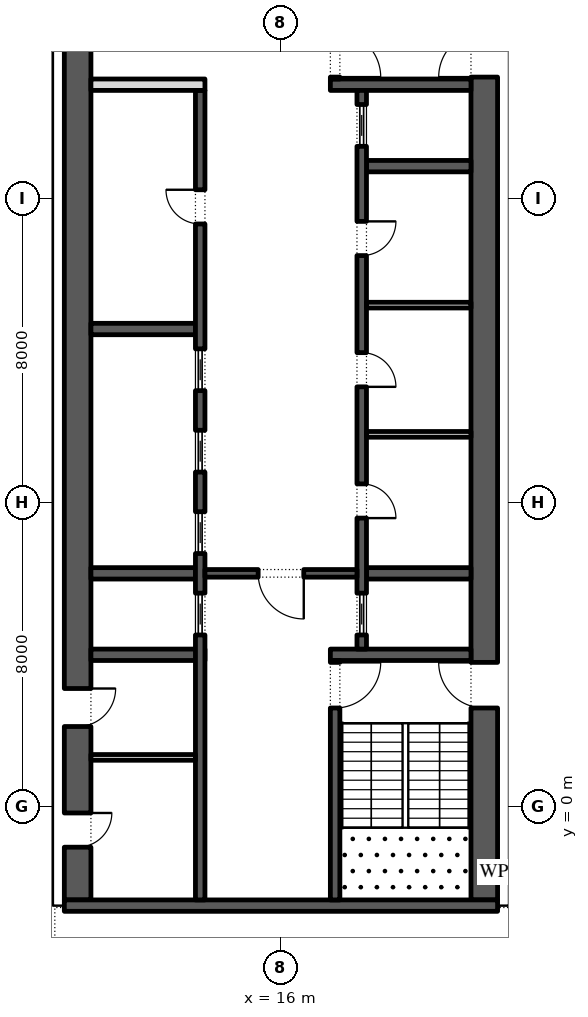
"""IFC4 building model, lengths in metres.
Left out: names, types, materials, properties, quantities, classifications, styles, units other than length and angle.
Written with IfcOpenShell. Run it as: python <this file> out.ifc"""

import sys

from ifc_helpers import new_model, si_unit, direction, frame, frame_2d, origin, place, context, subcontext, project, spatial, rectangle, extrude, element, fill, save


model = new_model("IFC4")
c1 = context("Model", 3, precision=1e-05, world=origin(), true_north=direction((0.0, 1.0)))
c2 = subcontext(c1, "Body", "Model", "MODEL_VIEW")
j1 = project(units=[si_unit("LENGTHUNIT", "METRE"), si_unit("PLANEANGLEUNIT", "RADIAN")], contexts=[c1])
p1 = place(None, origin())
s1 = spatial("IfcSite", under=j1, at=p1, CompositionType="ELEMENT")
p2 = place(p1, origin())
s2 = spatial("IfcBuilding", under=s1, at=p2, CompositionType="ELEMENT")
p3 = place(p2, frame((0.0, 0.0, 188.4)))
s3 = spatial("IfcBuildingStorey", under=s2, at=p3, CompositionType="ELEMENT", Elevation=188.4)
p4 = place(p3, frame((33.157, -5.092, 0.0), z_axis=(0.0, 0.0, 1.0), x_axis=(-0.224950279389, 0.974370243697, 0.0)))
e1 = element("IfcWall", 1, at=p4, inside=s3, PredefinedType="STANDARD", context=c2, shape_type="SweptSolid", body=[
    extrude(rectangle(XDim=49.5, YDim=0.3, at=frame_2d((24.75, 0.0))), origin(), (0.0, 0.0, 1.0), 4.0),
])
p5 = place(p4, frame((2.207, 0.0, 0.0)))
e2 = element("IfcOpeningElement", 2, at=p5, cuts=e1, PredefinedType="OPENING", context=c2, shape_type="SweptSolid", body=[
    extrude(rectangle(XDim=2.4, YDim=3.125, at=frame_2d((1.2, 1.562))), frame((0.0, 0.16, 0.0), z_axis=(0.0, -1.0, 0.0), x_axis=(1.0, 0.0, 0.0)), (0.0, 0.0, 1.0), 0.32),
])
p6 = place(p4, frame((8.121, 0.0, 0.45)))
e3 = element("IfcOpeningElement", 3, at=p6, cuts=e1, PredefinedType="OPENING", context=c2, shape_type="SweptSolid", body=[
    extrude(rectangle(XDim=4.5, YDim=2.875, at=frame_2d((2.25, 1.438))), frame((0.0, 0.16, 0.0), z_axis=(0.0, -1.0, 0.0), x_axis=(1.0, 0.0, 0.0)), (0.0, 0.0, 1.0), 0.32),
])
p7 = place(p4, frame((15.236, 0.0, 0.45)))
e4 = element("IfcOpeningElement", 4, at=p7, cuts=e1, PredefinedType="OPENING", context=c2, shape_type="SweptSolid", body=[
    extrude(rectangle(XDim=4.5, YDim=2.875, at=frame_2d((2.25, 1.438))), frame((0.0, 0.16, 0.0), z_axis=(0.0, -1.0, 0.0), x_axis=(1.0, 0.0, 0.0)), (0.0, 0.0, 1.0), 0.32),
])
p8 = place(p4, frame((22.35, 0.0, 0.45)))
e5 = element("IfcOpeningElement", 5, at=p8, cuts=e1, PredefinedType="OPENING", context=c2, shape_type="SweptSolid", body=[
    extrude(rectangle(XDim=4.5, YDim=3.0, at=frame_2d((2.25, 1.5))), frame((0.0, 0.16, 0.0), z_axis=(0.0, -1.0, 0.0), x_axis=(1.0, 0.0, 0.0)), (0.0, 0.0, 1.0), 0.32),
])
p9 = place(p4, frame((30.514, 0.0, 0.0)))
e6 = element("IfcOpeningElement", 6, at=p9, cuts=e1, PredefinedType="OPENING", context=c2, shape_type="SweptSolid", body=[
    extrude(rectangle(XDim=2.4, YDim=3.45, at=frame_2d((1.2, 1.725))), frame((0.0, 0.16, 0.0), z_axis=(0.0, -1.0, 0.0), x_axis=(1.0, 0.0, 0.0)), (0.0, 0.0, 1.0), 0.32),
])
p10 = place(p4, frame((36.579, 0.0, 0.45)))
e7 = element("IfcOpeningElement", 7, at=p10, cuts=e1, PredefinedType="OPENING", context=c2, shape_type="SweptSolid", body=[
    extrude(rectangle(XDim=4.5, YDim=3.05, at=frame_2d((2.25, 1.525))), frame((0.0, 0.16, 0.0), z_axis=(0.0, -1.0, 0.0), x_axis=(1.0, 0.0, 0.0)), (0.0, 0.0, 1.0), 0.32),
])
p11 = place(p4, frame((43.693, 0.0, 0.45)))
e8 = element("IfcOpeningElement", 8, at=p11, cuts=e1, PredefinedType="OPENING", context=c2, shape_type="SweptSolid", body=[
    extrude(rectangle(XDim=4.5, YDim=3.05, at=frame_2d((2.25, 1.525))), frame((0.0, 0.16, 0.0), z_axis=(0.0, -1.0, 0.0), x_axis=(1.0, 0.0, 0.0)), (0.0, 0.0, 1.0), 0.32),
])
p12 = place(p3, frame((21.35, -2.45, 0.0), z_axis=(0.0, 0.0, 1.0), x_axis=(0.0, 1.0, 0.0)))
e9 = element("IfcWall", 9, at=p12, inside=s3, PredefinedType="SHEAR", context=c2, shape_type="SweptSolid", body=[
    extrude(rectangle(XDim=27.9, YDim=0.7, at=frame_2d((13.95, 0.0))), origin(), (0.0, 0.0, 1.0), 4.0),
])
p13 = place(p12, frame((5.05, 0.0, 0.0)))
e10 = element("IfcOpeningElement", 10, at=p13, cuts=e9, PredefinedType="OPENING", context=c2, shape_type="SweptSolid", body=[
    extrude(rectangle(XDim=1.2, YDim=2.1, at=frame_2d((0.6, 1.05))), frame((0.0, 0.36, 0.0), z_axis=(0.0, -1.0, 0.0), x_axis=(1.0, 0.0, 0.0)), (0.0, 0.0, 1.0), 0.72),
])
p14 = place(p12, frame((21.65, 0.0, 0.0)))
e11 = element("IfcOpeningElement", 11, at=p14, cuts=e9, PredefinedType="OPENING", context=c2, shape_type="SweptSolid", body=[
    extrude(rectangle(XDim=1.2, YDim=2.1, at=frame_2d((0.6, 1.05))), frame((0.0, 0.36, 0.0), z_axis=(0.0, -1.0, 0.0), x_axis=(1.0, 0.0, 0.0)), (0.0, 0.0, 1.0), 0.72),
])
p15 = place(p3, frame((10.65, -2.45, 0.0), z_axis=(0.0, 0.0, 1.0), x_axis=(0.0, 1.0, 0.0)))
e12 = element("IfcWall", 12, at=p15, inside=s3, PredefinedType="SHEAR", context=c2, shape_type="SweptSolid", body=[
    extrude(rectangle(XDim=27.9, YDim=0.7, at=frame_2d((13.95, 0.0))), origin(), (0.0, 0.0, 1.0), 4.0),
])
p16 = place(p15, frame((23.65, 0.0, 0.0)))
e13 = element("IfcOpeningElement", 13, at=p16, cuts=e12, PredefinedType="OPENING", context=c2, shape_type="SweptSolid", body=[
    extrude(rectangle(XDim=2.4, YDim=2.1, at=frame_2d((1.2, 1.05))), frame((0.0, 0.36, 0.0), z_axis=(0.0, -1.0, 0.0), x_axis=(1.0, 0.0, 0.0)), (0.0, 0.0, 1.0), 0.72),
])
p17 = place(p15, frame((1.387, 0.0, 0.0)))
e14 = element("IfcOpeningElement", 14, at=p17, cuts=e12, PredefinedType="OPENING", context=c2, shape_type="SweptSolid", body=[
    extrude(rectangle(XDim=0.9, YDim=2.1, at=frame_2d((0.45, 1.05))), frame((0.0, 0.36, 0.0), z_axis=(0.0, -1.0, 0.0), x_axis=(1.0, 0.0, 0.0)), (0.0, 0.0, 1.0), 0.72),
])
p18 = place(p15, frame((4.562, 0.0, 0.0)))
e15 = element("IfcOpeningElement", 15, at=p18, cuts=e12, PredefinedType="OPENING", context=c2, shape_type="SweptSolid", body=[
    extrude(rectangle(XDim=1.0, YDim=2.1, at=frame_2d((0.5, 1.05))), frame((0.0, 0.36, 0.0), z_axis=(0.0, -1.0, 0.0), x_axis=(1.0, 0.0, 0.0)), (0.0, 0.0, 1.0), 0.72),
])
p19 = place(p3, frame((10.3, -2.6, 0.0), z_axis=(0.0, 0.0, 1.0), x_axis=(1.0, 0.0, 0.0)))
e16 = element("IfcWall", 16, at=p19, inside=s3, PredefinedType="SHEAR", context=c2, shape_type="SweptSolid", body=[
    extrude(rectangle(XDim=11.4, YDim=0.3, at=frame_2d((5.7, 0.0))), origin(), (0.0, 0.0, 1.0), 4.0),
])
p20 = place(p3, frame((17.3, 4.0, 0.0), z_axis=(0.0, 0.0, 1.0), x_axis=(1.0, 0.0, 0.0)))
e17 = element("IfcWall", 17, at=p20, inside=s3, PredefinedType="SHEAR", context=c2, shape_type="SweptSolid", body=[
    extrude(rectangle(XDim=3.7, YDim=0.3, at=frame_2d((1.85, 0.0))), origin(), (0.0, 0.0, 1.0), 4.0),
])
p21 = place(p3, frame((17.425, -2.45, 0.0), z_axis=(0.0, 0.0, 1.0), x_axis=(0.0, 1.0, 0.0)))
e18 = element("IfcWall", 18, at=p21, inside=s3, PredefinedType="SHEAR", context=c2, shape_type="SweptSolid", body=[
    extrude(rectangle(XDim=6.3, YDim=0.25, at=frame_2d((3.15, 0.0))), origin(), (0.0, 0.0, 1.0), 4.0),
])
p22 = place(p21, frame((5.05, 0.0, 0.0)))
e19 = element("IfcOpeningElement", 19, at=p22, cuts=e18, PredefinedType="OPENING", context=c2, shape_type="SweptSolid", body=[
    extrude(rectangle(XDim=1.2, YDim=2.1, at=frame_2d((0.6, 1.05))), frame((0.0, 0.135, 0.0), z_axis=(0.0, -1.0, 0.0), x_axis=(1.0, 0.0, 0.0)), (0.0, 0.0, 1.0), 0.27),
])
p23 = place(p3, frame((17.3, 19.0, 0.0), z_axis=(0.0, 0.0, 1.0), x_axis=(1.0, 0.0, 0.0)))
e20 = element("IfcWall", 20, at=p23, inside=s3, PredefinedType="SHEAR", context=c2, shape_type="SweptSolid", body=[
    extrude(rectangle(XDim=3.7, YDim=0.3, at=frame_2d((1.85, 0.0))), origin(), (0.0, 0.0, 1.0), 4.0),
])
p24 = place(p3, frame((17.425, 19.15, 0.0), z_axis=(0.0, 0.0, 1.0), x_axis=(0.0, 1.0, 0.0)))
e21 = element("IfcWall", 21, at=p24, inside=s3, PredefinedType="SHEAR", context=c2, shape_type="SweptSolid", body=[
    extrude(rectangle(XDim=6.3, YDim=0.25, at=frame_2d((3.15, 0.0))), origin(), (0.0, 0.0, 1.0), 4.0),
])
p25 = place(p24, frame((0.05, 0.0, 0.0)))
e22 = element("IfcOpeningElement", 22, at=p25, cuts=e21, PredefinedType="OPENING", context=c2, shape_type="SweptSolid", body=[
    extrude(rectangle(XDim=1.2, YDim=2.1, at=frame_2d((0.6, 1.05))), frame((0.0, 0.135, 0.0), z_axis=(0.0, -1.0, 0.0), x_axis=(1.0, 0.0, 0.0)), (0.0, 0.0, 1.0), 0.27),
])
for number, where, z_axis, x_axis in (
    (23, (18.25, 6.143, 0.0), (0.0, 0.0, 1.0), (1.0, 0.0, 0.0)),
    (24, (18.25, 16.857, 0.0), (0.0, 0.0, 1.0), (1.0, 0.0, 0.0)),
):
    element("IfcWall", number, at=place(p3, frame(where, z_axis=z_axis, x_axis=x_axis)), inside=s3, PredefinedType="SHEAR", context=c2, shape_type="SweptSolid", body=[
        extrude(rectangle(XDim=2.75, YDim=0.3, at=frame_2d((1.375, 0.0))), origin(), (0.0, 0.0, 1.0), 4.0),
    ])
p26 = place(p3, frame((18.125, 4.15, 0.0), z_axis=(0.0, 0.0, 1.0), x_axis=(0.0, 1.0, 0.0)))
e25 = element("IfcWall", 25, at=p26, inside=s3, PredefinedType="SHEAR", context=c2, shape_type="SweptSolid", body=[
    extrude(rectangle(XDim=14.7, YDim=0.25, at=frame_2d((7.35, 0.0))), origin(), (0.0, 0.0, 1.0), 4.0),
])
p27 = place(p26, frame((3.446, 0.0, 0.0)))
e26 = element("IfcOpeningElement", 26, at=p27, cuts=e25, PredefinedType="OPENING", context=c2, shape_type="SweptSolid", body=[
    extrude(rectangle(XDim=0.9, YDim=2.1, at=frame_2d((0.45, 1.05))), frame((0.0, 0.135, 0.0), z_axis=(0.0, -1.0, 0.0), x_axis=(1.0, 0.0, 0.0)), (0.0, 0.0, 1.0), 0.27),
])
p28 = place(p26, frame((6.9, 0.0, 0.0)))
e27 = element("IfcOpeningElement", 27, at=p28, cuts=e25, PredefinedType="OPENING", context=c2, shape_type="SweptSolid", body=[
    extrude(rectangle(XDim=0.9, YDim=2.1, at=frame_2d((0.45, 1.05))), frame((0.0, 0.135, 0.0), z_axis=(0.0, -1.0, 0.0), x_axis=(1.0, 0.0, 0.0)), (0.0, 0.0, 1.0), 0.27),
])
p29 = place(p26, frame((10.354, 0.0, 0.0)))
e28 = element("IfcOpeningElement", 28, at=p29, cuts=e25, PredefinedType="OPENING", context=c2, shape_type="SweptSolid", body=[
    extrude(rectangle(XDim=0.9, YDim=2.1, at=frame_2d((0.45, 1.05))), frame((0.0, 0.135, 0.0), z_axis=(0.0, -1.0, 0.0), x_axis=(1.0, 0.0, 0.0)), (0.0, 0.0, 1.0), 0.27),
])
p30 = place(p26, frame((0.371, 0.0, 0.0)))
e29 = element("IfcOpeningElement", 29, at=p30, cuts=e25, PredefinedType="OPENING", context=c2, shape_type="SweptSolid", body=[
    extrude(rectangle(XDim=1.1, YDim=2.1, at=frame_2d((0.55, 1.05))), frame((0.0, 0.135, 0.0), z_axis=(0.0, -1.0, 0.0), x_axis=(1.0, 0.0, 0.0)), (0.0, 0.0, 1.0), 0.27),
])
p31 = place(p26, frame((13.229, 0.0, 0.0)))
e30 = element("IfcOpeningElement", 30, at=p31, cuts=e25, PredefinedType="OPENING", context=c2, shape_type="SweptSolid", body=[
    extrude(rectangle(XDim=1.1, YDim=2.1, at=frame_2d((0.55, 1.05))), frame((0.0, 0.135, 0.0), z_axis=(0.0, -1.0, 0.0), x_axis=(1.0, 0.0, 0.0)), (0.0, 0.0, 1.0), 0.27),
])
for number, where, z_axis, x_axis in (
    (31, (18.25, 9.8, 0.0), (0.0, 0.0, 1.0), (1.0, 0.0, 0.0)),
    (32, (18.25, 13.2, 0.0), (0.0, 0.0, 1.0), (1.0, 0.0, 0.0)),
):
    element("IfcWall", number, at=place(p3, frame(where, z_axis=z_axis, x_axis=x_axis)), inside=s3, PredefinedType="PARTITIONING", context=c2, shape_type="SweptSolid", body=[
        extrude(rectangle(XDim=2.75, YDim=0.15, at=frame_2d((1.375, 0.0))), origin(), (0.0, 0.0, 1.0), 4.0),
    ])
p32 = place(p3, frame((11.0, 4.0, 0.0), z_axis=(0.0, 0.0, 1.0), x_axis=(1.0, 0.0, 0.0)))
e33 = element("IfcWall", 33, at=p32, inside=s3, PredefinedType="SHEAR", context=c2, shape_type="SweptSolid", body=[
    extrude(rectangle(XDim=3.0, YDim=0.3, at=frame_2d((1.5, 0.0))), origin(), (0.0, 0.0, 1.0), 4.0),
])
for number, where, z_axis, x_axis in (
    (34, (11.0, 6.143, 0.0), (0.0, 0.0, 1.0), (1.0, 0.0, 0.0)),
    (35, (11.0, 12.571, 0.0), (0.0, 0.0, 1.0), (1.0, 0.0, 0.0)),
):
    element("IfcWall", number, at=place(p3, frame(where, z_axis=z_axis, x_axis=x_axis)), inside=s3, PredefinedType="SHEAR", context=c2, shape_type="SweptSolid", body=[
        extrude(rectangle(XDim=2.75, YDim=0.3, at=frame_2d((1.375, 0.0))), origin(), (0.0, 0.0, 1.0), 4.0),
    ])
p33 = place(p3, frame((13.875, -2.45, 0.0), z_axis=(0.0, 0.0, 1.0), x_axis=(0.0, 1.0, 0.0)))
e36 = element("IfcWall", 36, at=p33, inside=s3, PredefinedType="SHEAR", context=c2, shape_type="SweptSolid", body=[
    extrude(rectangle(XDim=21.3, YDim=0.25, at=frame_2d((10.65, 0.0))), origin(), (0.0, 0.0, 1.0), 4.0),
])
p34 = place(p33, frame((17.786, 0.0, 0.0)))
e37 = element("IfcOpeningElement", 37, at=p34, cuts=e36, PredefinedType="OPENING", context=c2, shape_type="SweptSolid", body=[
    extrude(rectangle(XDim=0.9, YDim=2.1, at=frame_2d((0.45, 1.05))), frame((0.0, 0.135, 0.0), z_axis=(0.0, -1.0, 0.0), x_axis=(1.0, 0.0, 0.0)), (0.0, 0.0, 1.0), 0.27),
])
p35 = place(p33, frame((6.971, 0.0, 0.0)))
e38 = element("IfcOpeningElement", 38, at=p35, cuts=e36, PredefinedType="OPENING", context=c2, shape_type="SweptSolid", body=[
    extrude(rectangle(XDim=1.1, YDim=2.1, at=frame_2d((0.55, 1.05))), frame((0.0, 0.135, 0.0), z_axis=(0.0, -1.0, 0.0), x_axis=(1.0, 0.0, 0.0)), (0.0, 0.0, 1.0), 0.27),
])
p36 = place(p33, frame((9.114, 0.0, 0.0)))
e39 = element("IfcOpeningElement", 39, at=p36, cuts=e36, PredefinedType="OPENING", context=c2, shape_type="SweptSolid", body=[
    extrude(rectangle(XDim=1.1, YDim=2.1, at=frame_2d((0.55, 1.05))), frame((0.0, 0.135, 0.0), z_axis=(0.0, -1.0, 0.0), x_axis=(1.0, 0.0, 0.0)), (0.0, 0.0, 1.0), 0.27),
])
p37 = place(p33, frame((11.257, 0.0, 0.0)))
e40 = element("IfcOpeningElement", 40, at=p37, cuts=e36, PredefinedType="OPENING", context=c2, shape_type="SweptSolid", body=[
    extrude(rectangle(XDim=1.1, YDim=2.1, at=frame_2d((0.55, 1.05))), frame((0.0, 0.135, 0.0), z_axis=(0.0, -1.0, 0.0), x_axis=(1.0, 0.0, 0.0)), (0.0, 0.0, 1.0), 0.27),
])
p38 = place(p33, frame((13.4, 0.0, 0.0)))
e41 = element("IfcOpeningElement", 41, at=p38, cuts=e36, PredefinedType="OPENING", context=c2, shape_type="SweptSolid", body=[
    extrude(rectangle(XDim=1.1, YDim=2.1, at=frame_2d((0.55, 1.05))), frame((0.0, 0.135, 0.0), z_axis=(0.0, -1.0, 0.0), x_axis=(1.0, 0.0, 0.0)), (0.0, 0.0, 1.0), 0.27),
])
p39 = place(p3, frame((11.0, 19.0, 0.0), z_axis=(0.0, 0.0, 1.0), x_axis=(1.0, 0.0, 0.0)))
e42 = element("IfcWall", 42, at=p39, inside=s3, PredefinedType="PARTITIONING", context=c2, shape_type="SweptSolid", body=[
    extrude(rectangle(XDim=3.0, YDim=0.3, at=frame_2d((1.5, 0.0))), origin(), (0.0, 0.0, 1.0), 4.0),
])
p40 = place(p3, frame((14.0, 6.143, 0.0), z_axis=(0.0, 0.0, 1.0), x_axis=(1.0, 0.0, 0.0)))
e43 = element("IfcWall", 43, at=p40, inside=s3, PredefinedType="SHEAR", context=c2, shape_type="SweptSolid", body=[
    extrude(rectangle(XDim=4.0, YDim=0.2, at=frame_2d((2.0, 0.0))), origin(), (0.0, 0.0, 1.0), 4.0),
])
p41 = place(p40, frame((1.4, 0.0, 0.0)))
e44 = element("IfcOpeningElement", 44, at=p41, cuts=e43, PredefinedType="OPENING", context=c2, shape_type="SweptSolid", body=[
    extrude(rectangle(XDim=1.2, YDim=2.1, at=frame_2d((0.6, 1.05))), frame((0.0, 0.11, 0.0), z_axis=(0.0, -1.0, 0.0), x_axis=(1.0, 0.0, 0.0)), (0.0, 0.0, 1.0), 0.22),
])
p42 = place(p3, frame((11.0, 1.3, 0.0), z_axis=(0.0, 0.0, 1.0), x_axis=(1.0, 0.0, 0.0)))
e45 = element("IfcWall", 45, at=p42, inside=s3, PredefinedType="PARTITIONING", context=c2, shape_type="SweptSolid", body=[
    extrude(rectangle(XDim=2.75, YDim=0.15, at=frame_2d((1.375, 0.0))), origin(), (0.0, 0.0, 1.0), 4.0),
])
p43 = place(p27, frame((0.9, -0.2, 0.0), z_axis=(0.0, 0.0, 1.0), x_axis=(-1.0, 0.0, 0.0)))
e46 = element("IfcDoor", 46, at=p43, inside=s3, OperationType="SINGLE_SWING_LEFT", PredefinedType="DOOR", context=c2, shape_type="SweptSolid", body=[
    extrude(rectangle(XDim=0.9, YDim=2.1, at=frame_2d((0.45, 1.05))), frame((0.0, -0.075, 0.0), z_axis=(0.0, -1.0, 0.0), x_axis=(1.0, 0.0, 0.0)), (0.0, 0.0, 1.0), 0.05),
])
fill(e26, e46)
p44 = place(p28, frame((0.9, -0.2, 0.0), z_axis=(0.0, 0.0, 1.0), x_axis=(-1.0, 0.0, 0.0)))
e47 = element("IfcDoor", 47, at=p44, inside=s3, OperationType="SINGLE_SWING_LEFT", PredefinedType="DOOR", context=c2, shape_type="SweptSolid", body=[
    extrude(rectangle(XDim=0.9, YDim=2.1, at=frame_2d((0.45, 1.05))), frame((0.0, -0.075, 0.0), z_axis=(0.0, -1.0, 0.0), x_axis=(1.0, 0.0, 0.0)), (0.0, 0.0, 1.0), 0.05),
])
fill(e27, e47)
p45 = place(p29, frame((0.9, -0.2, 0.0), z_axis=(0.0, 0.0, 1.0), x_axis=(-1.0, 0.0, 0.0)))
e48 = element("IfcDoor", 48, at=p45, inside=s3, OperationType="SINGLE_SWING_RIGHT", PredefinedType="DOOR", context=c2, shape_type="SweptSolid", body=[
    extrude(rectangle(XDim=0.9, YDim=2.1, at=frame_2d((0.45, 1.05))), frame((0.0, -0.075, 0.0), z_axis=(0.0, -1.0, 0.0), x_axis=(1.0, 0.0, 0.0)), (0.0, 0.0, 1.0), 0.05),
])
fill(e28, e48)
p46 = place(p30, origin())
e49 = element("IfcDoor", 49, at=p46, inside=s3, OperationType="SLIDING_TO_LEFT", PredefinedType="DOOR", context=c2, shape_type="SweptSolid", body=[
    extrude(rectangle(XDim=1.1, YDim=2.1, at=frame_2d((0.55, 1.05))), frame((0.0, 0.025, 0.0), z_axis=(0.0, -1.0, 0.0), x_axis=(1.0, 0.0, 0.0)), (0.0, 0.0, 1.0), 0.05),
])
fill(e29, e49)
p47 = place(p31, origin())
e50 = element("IfcDoor", 50, at=p47, inside=s3, OperationType="SLIDING_TO_LEFT", PredefinedType="DOOR", context=c2, shape_type="SweptSolid", body=[
    extrude(rectangle(XDim=1.1, YDim=2.1, at=frame_2d((0.55, 1.05))), frame((0.0, 0.025, 0.0), z_axis=(0.0, -1.0, 0.0), x_axis=(1.0, 0.0, 0.0)), (0.0, 0.0, 1.0), 0.05),
])
fill(e30, e50)
p48 = place(p34, origin())
e51 = element("IfcDoor", 51, at=p48, inside=s3, OperationType="SINGLE_SWING_LEFT", PredefinedType="DOOR", context=c2, shape_type="SweptSolid", body=[
    extrude(rectangle(XDim=0.9, YDim=2.1, at=frame_2d((0.45, 1.05))), frame((0.0, 0.125, 0.0), z_axis=(0.0, -1.0, 0.0), x_axis=(1.0, 0.0, 0.0)), (0.0, 0.0, 1.0), 0.05),
])
fill(e37, e51)
p49 = place(p35, origin())
e52 = element("IfcDoor", 52, at=p49, inside=s3, OperationType="SLIDING_TO_LEFT", PredefinedType="DOOR", context=c2, shape_type="SweptSolid", body=[
    extrude(rectangle(XDim=1.1, YDim=2.1, at=frame_2d((0.55, 1.05))), frame((0.0, 0.025, 0.0), z_axis=(0.0, -1.0, 0.0), x_axis=(1.0, 0.0, 0.0)), (0.0, 0.0, 1.0), 0.05),
])
fill(e38, e52)
p50 = place(p36, origin())
e53 = element("IfcDoor", 53, at=p50, inside=s3, OperationType="SLIDING_TO_LEFT", PredefinedType="DOOR", context=c2, shape_type="SweptSolid", body=[
    extrude(rectangle(XDim=1.1, YDim=2.1, at=frame_2d((0.55, 1.05))), frame((0.0, 0.025, 0.0), z_axis=(0.0, -1.0, 0.0), x_axis=(1.0, 0.0, 0.0)), (0.0, 0.0, 1.0), 0.05),
])
fill(e39, e53)
p51 = place(p37, origin())
e54 = element("IfcDoor", 54, at=p51, inside=s3, OperationType="SLIDING_TO_LEFT", PredefinedType="DOOR", context=c2, shape_type="SweptSolid", body=[
    extrude(rectangle(XDim=1.1, YDim=2.1, at=frame_2d((0.55, 1.05))), frame((0.0, 0.025, 0.0), z_axis=(0.0, -1.0, 0.0), x_axis=(1.0, 0.0, 0.0)), (0.0, 0.0, 1.0), 0.05),
])
fill(e40, e54)
p52 = place(p38, origin())
e55 = element("IfcDoor", 55, at=p52, inside=s3, OperationType="SLIDING_TO_LEFT", PredefinedType="DOOR", context=c2, shape_type="SweptSolid", body=[
    extrude(rectangle(XDim=1.1, YDim=2.1, at=frame_2d((0.55, 1.05))), frame((0.0, 0.025, 0.0), z_axis=(0.0, -1.0, 0.0), x_axis=(1.0, 0.0, 0.0)), (0.0, 0.0, 1.0), 0.05),
])
fill(e41, e55)
p53 = place(p41, frame((1.2, 0.0, 0.0), z_axis=(0.0, 0.0, 1.0), x_axis=(-1.0, 0.0, 0.0)))
e56 = element("IfcDoor", 56, at=p53, inside=s3, OperationType="SINGLE_SWING_RIGHT", PredefinedType="DOOR", context=c2, shape_type="SweptSolid", body=[
    extrude(rectangle(XDim=1.2, YDim=2.1, at=frame_2d((0.6, 1.05))), frame((0.0, 0.025, 0.0), z_axis=(0.0, -1.0, 0.0), x_axis=(1.0, 0.0, 0.0)), (0.0, 0.0, 1.0), 0.05),
])
fill(e44, e56)
p54 = place(p22, frame((1.2, 0.0, 0.0), z_axis=(0.0, 0.0, 1.0), x_axis=(-1.0, 0.0, 0.0)))
e57 = element("IfcDoor", 57, at=p54, inside=s3, OperationType="SINGLE_SWING_RIGHT", PredefinedType="DOOR", context=c2, shape_type="SweptSolid", body=[
    extrude(rectangle(XDim=1.2, YDim=2.1, at=frame_2d((0.6, 1.05))), frame((0.0, 0.025, 0.0), z_axis=(0.0, -1.0, 0.0), x_axis=(1.0, 0.0, 0.0)), (0.0, 0.0, 1.0), 0.05),
])
fill(e19, e57)
p55 = place(p13, origin())
e58 = element("IfcDoor", 58, at=p55, inside=s3, OperationType="SINGLE_SWING_LEFT", PredefinedType="DOOR", context=c2, shape_type="SweptSolid", body=[
    extrude(rectangle(XDim=1.2, YDim=2.1, at=frame_2d((0.6, 1.05))), frame((0.0, 0.025, 0.0), z_axis=(0.0, -1.0, 0.0), x_axis=(1.0, 0.0, 0.0)), (0.0, 0.0, 1.0), 0.05),
])
fill(e10, e58)
p56 = place(p25, frame((1.2, 0.0, 0.0), z_axis=(0.0, 0.0, 1.0), x_axis=(-1.0, 0.0, 0.0)))
e59 = element("IfcDoor", 59, at=p56, inside=s3, OperationType="SINGLE_SWING_LEFT", PredefinedType="DOOR", context=c2, shape_type="SweptSolid", body=[
    extrude(rectangle(XDim=1.2, YDim=2.1, at=frame_2d((0.6, 1.05))), frame((0.0, 0.025, 0.0), z_axis=(0.0, -1.0, 0.0), x_axis=(1.0, 0.0, 0.0)), (0.0, 0.0, 1.0), 0.05),
])
fill(e22, e59)
p57 = place(p14, origin())
e60 = element("IfcDoor", 60, at=p57, inside=s3, OperationType="SINGLE_SWING_RIGHT", PredefinedType="DOOR", context=c2, shape_type="SweptSolid", body=[
    extrude(rectangle(XDim=1.2, YDim=2.1, at=frame_2d((0.6, 1.05))), frame((0.0, 0.025, 0.0), z_axis=(0.0, -1.0, 0.0), x_axis=(1.0, 0.0, 0.0)), (0.0, 0.0, 1.0), 0.05),
])
fill(e11, e60)
p58 = place(p17, frame((0.9, -0.65, 0.0), z_axis=(0.0, 0.0, 1.0), x_axis=(-1.0, 0.0, 0.0)))
e61 = element("IfcDoor", 61, at=p58, inside=s3, OperationType="SINGLE_SWING_RIGHT", PredefinedType="DOOR", context=c2, shape_type="SweptSolid", body=[
    extrude(rectangle(XDim=0.9, YDim=2.1, at=frame_2d((0.45, 1.05))), frame((0.0, -0.3, 0.0), z_axis=(0.0, -1.0, 0.0), x_axis=(1.0, 0.0, 0.0)), (0.0, 0.0, 1.0), 0.05),
])
fill(e14, e61)
p59 = place(p18, frame((1.0, -0.65, 0.0), z_axis=(0.0, 0.0, 1.0), x_axis=(-1.0, 0.0, 0.0)))
e62 = element("IfcDoor", 62, at=p59, inside=s3, OperationType="SINGLE_SWING_RIGHT", PredefinedType="DOOR", context=c2, shape_type="SweptSolid", body=[
    extrude(rectangle(XDim=1.0, YDim=2.1, at=frame_2d((0.5, 1.05))), frame((0.0, -0.3, 0.0), z_axis=(0.0, -1.0, 0.0), x_axis=(1.0, 0.0, 0.0)), (0.0, 0.0, 1.0), 0.05),
])
fill(e15, e62)
save(model, sys.argv[1])
